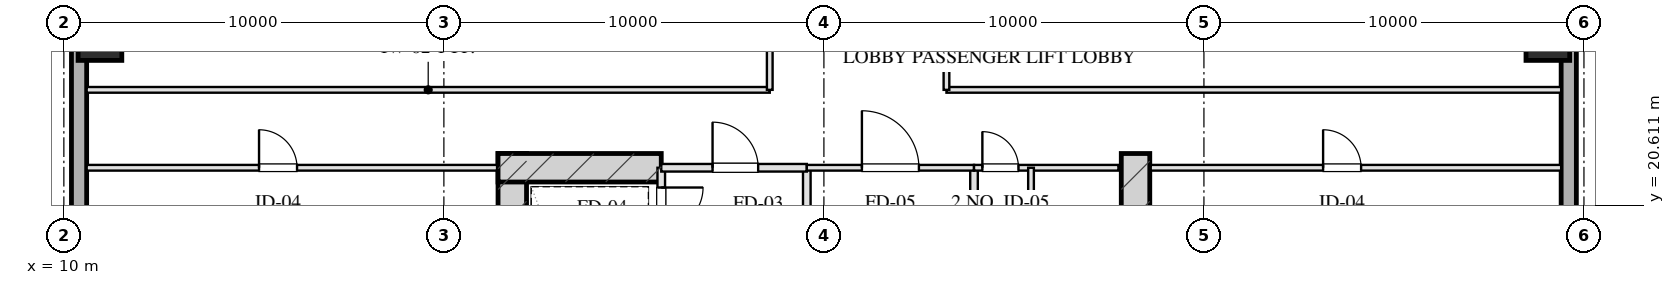
"""IFC4 building model, lengths in metres.
Left out: names, types, materials, properties, quantities, classifications, styles, units other than length and angle.
Written with IfcOpenShell. Run it as: python <this file> out.ifc"""

import sys

from ifc_helpers import new_model, si_unit, direction, frame, frame_2d, origin, origin_2d, place, context, subcontext, project, spatial, rectangle, hollow_rectangle, extrude, element, fill, save


model = new_model("IFC4")
c1 = context("Model", 3, precision=1e-05, world=origin(), true_north=direction((0.0, 1.0)))
c2 = subcontext(c1, "Body", "Model", "MODEL_VIEW")
j1 = project(units=[si_unit("LENGTHUNIT", "METRE"), si_unit("PLANEANGLEUNIT", "RADIAN")], contexts=[c1])
p1 = place(None, origin())
s1 = spatial("IfcSite", under=j1, at=p1, CompositionType="ELEMENT")
p2 = place(p1, origin())
s2 = spatial("IfcBuilding", under=s1, at=p2, CompositionType="ELEMENT")
p3 = place(p2, frame((0.0, 0.0, 64.4)))
s3 = spatial("IfcBuildingStorey", under=s2, at=p3, CompositionType="ELEMENT", Elevation=64.4)
for number, where, z_axis, x_axis in (
    (1, (21.8, 21.975, 0.0), (0.0, 0.0, 1.0), (0.0, -1.0, 0.0)),
    (2, (38.2, 21.975, 0.0), (0.0, 0.0, 1.0), (0.0, -1.0, 0.0)),
):
    element("IfcWall", number, at=place(p3, frame(where, z_axis=z_axis, x_axis=x_axis)), inside=s3, PredefinedType="SHEAR", context=c2, shape_type="SweptSolid", body=[
        extrude(rectangle(XDim=9.63, YDim=0.75, at=frame_2d((4.815, 0.0))), origin(), (0.0, 0.0, 1.0), 3.45),
    ])
p4 = place(p3, frame((21.425, 21.6, 0.0), z_axis=(0.0, 0.0, 1.0), x_axis=(1.0, 0.0, 0.0)))
e3 = element("IfcWall", 3, at=p4, inside=s3, PredefinedType="SHEAR", context=c2, shape_type="SweptSolid", body=[
    extrude(rectangle(XDim=4.295, YDim=0.75, at=frame_2d((2.147, 0.0))), origin(), (0.0, 0.0, 1.0), 3.45),
])
for number, where, z_axis, x_axis in (
    (4, (10.95, 25.0, 0.0), (0.0, 0.0, 1.0), (1.0, 0.0, 0.0)),
    (5, (49.05, 25.0, 0.0), (0.0, 0.0, 1.0), (1.0, 0.0, 0.0)),
):
    element("IfcColumn", number, at=place(p3, frame(where, z_axis=z_axis, x_axis=x_axis)), inside=s3, PredefinedType="COLUMN", context=c2, shape_type="SweptSolid", body=[
        extrude(hollow_rectangle(XDim=1.15, YDim=1.15, WallThickness=0.04, at=origin_2d()), origin(), (0.0, 0.0, 1.0), 3.451),
    ])
p5 = place(p3, frame((10.4, 7.2, 0.0), z_axis=(0.0, 0.0, 1.0), x_axis=(0.0, 1.0, 0.0)))
e6 = element("IfcWall", 6, at=p5, inside=s3, PredefinedType="SOLIDWALL", context=c2, shape_type="SweptSolid", body=[
    extrude(rectangle(XDim=53.6, YDim=0.4, at=frame_2d((26.8, 0.0))), origin(), (0.0, 0.0, 1.0), 2.61),
])
p6 = place(p5, frame((19.15, 0.0, 0.75)))
e7 = element("IfcOpeningElement", 7, at=p6, cuts=e6, PredefinedType="OPENING", context=c2, shape_type="SweptSolid", body=[
    extrude(rectangle(XDim=2.5, YDim=1.46, at=frame_2d((1.25, 0.73))), frame((0.0, 0.21, 0.0), z_axis=(0.0, -1.0, 0.0), x_axis=(1.0, 0.0, 0.0)), (0.0, 0.0, 1.0), 0.42),
])
p7 = place(p5, frame((31.95, 0.0, 0.75)))
e8 = element("IfcOpeningElement", 8, at=p7, cuts=e6, PredefinedType="OPENING", context=c2, shape_type="SweptSolid", body=[
    extrude(rectangle(XDim=2.5, YDim=1.46, at=frame_2d((1.25, 0.73))), frame((0.0, 0.21, 0.0), z_axis=(0.0, -1.0, 0.0), x_axis=(1.0, 0.0, 0.0)), (0.0, 0.0, 1.0), 0.42),
])
p8 = place(p3, frame((49.6, 60.8, 0.0), z_axis=(0.0, 0.0, 1.0), x_axis=(0.0, -1.0, 0.0)))
e9 = element("IfcWall", 9, at=p8, inside=s3, PredefinedType="SOLIDWALL", context=c2, shape_type="SweptSolid", body=[
    extrude(rectangle(XDim=53.6, YDim=0.4, at=frame_2d((26.8, 0.0))), origin(), (0.0, 0.0, 1.0), 2.61),
])
p9 = place(p8, frame((28.15, 0.0, 0.75)))
e10 = element("IfcOpeningElement", 10, at=p9, cuts=e9, PredefinedType="OPENING", context=c2, shape_type="SweptSolid", body=[
    extrude(rectangle(XDim=2.5, YDim=1.46, at=frame_2d((1.25, 0.73))), frame((0.0, 0.21, 0.0), z_axis=(0.0, -1.0, 0.0), x_axis=(1.0, 0.0, 0.0)), (0.0, 0.0, 1.0), 0.42),
])
p10 = place(p8, frame((22.95, 0.0, 0.75)))
e11 = element("IfcOpeningElement", 11, at=p10, cuts=e9, PredefinedType="OPENING", context=c2, shape_type="SweptSolid", body=[
    extrude(rectangle(XDim=2.5, YDim=1.46, at=frame_2d((1.25, 0.73))), frame((0.0, 0.21, 0.0), z_axis=(0.0, -1.0, 0.0), x_axis=(1.0, 0.0, 0.0)), (0.0, 0.0, 1.0), 0.42),
])
p11 = place(p3, frame((25.72, 21.6, 0.0), z_axis=(0.0, 0.0, 1.0), x_axis=(0.0, -1.0, 0.0)))
e12 = element("IfcWall", 12, at=p11, inside=s3, PredefinedType="PARTITIONING", context=c2, shape_type="SweptSolid", body=[
    extrude(rectangle(XDim=1.9, YDim=0.2, at=frame_2d((0.95, 0.0))), origin(), (0.0, 0.0, 1.0), 3.175),
])
p12 = place(p11, frame((0.52, 0.0, 0.0)))
e13 = element("IfcOpeningElement", 13, at=p12, cuts=e12, PredefinedType="OPENING", context=c2, shape_type="SweptSolid", body=[
    extrude(rectangle(XDim=1.1, YDim=2.05, at=frame_2d((0.55, 1.025))), frame((0.0, 0.11, 0.0), z_axis=(0.0, -1.0, 0.0), x_axis=(1.0, 0.0, 0.0)), (0.0, 0.0, 1.0), 0.22),
])
p13 = place(p3, frame((29.55, 21.6, 0.0), z_axis=(0.0, 0.0, 1.0), x_axis=(0.0, -1.0, 0.0)))
e14 = element("IfcWall", 14, at=p13, inside=s3, PredefinedType="PARTITIONING", context=c2, shape_type="SweptSolid", body=[
    extrude(rectangle(XDim=8.43, YDim=0.2, at=frame_2d((4.215, 0.0))), origin(), (0.0, 0.0, 1.0), 3.175),
])
p14 = place(p3, frame((25.72, 21.6, 0.0), z_axis=(0.0, 0.0, 1.0), x_axis=(1.0, 0.0, 0.0)))
e15 = element("IfcWall", 15, at=p14, inside=s3, PredefinedType="PARTITIONING", context=c2, shape_type="SweptSolid", body=[
    extrude(rectangle(XDim=3.83, YDim=0.2, at=frame_2d((1.915, 0.0))), origin(), (0.0, 0.0, 1.0), 3.175),
])
p15 = place(p14, frame((1.35, 0.0, 0.0)))
e16 = element("IfcOpeningElement", 16, at=p15, cuts=e15, PredefinedType="OPENING", context=c2, shape_type="SweptSolid", body=[
    extrude(rectangle(XDim=1.2, YDim=2.05, at=frame_2d((0.6, 1.025))), frame((0.0, 0.11, 0.0), z_axis=(0.0, -1.0, 0.0), x_axis=(1.0, 0.0, 0.0)), (0.0, 0.0, 1.0), 0.22),
])
p16 = place(p3, frame((33.95, 21.6, 0.0), z_axis=(0.0, 0.0, 1.0), x_axis=(0.0, -1.0, 0.0)))
e17 = element("IfcWall", 17, at=p16, inside=s3, PredefinedType="PARTITIONING", context=c2, shape_type="SweptSolid", body=[
    extrude(rectangle(XDim=8.43, YDim=0.2, at=frame_2d((4.215, 0.0))), origin(), (0.0, 0.0, 1.0), 3.175),
])
p17 = place(p3, frame((29.55, 21.6, 0.0), z_axis=(0.0, 0.0, 1.0), x_axis=(1.0, 0.0, 0.0)))
e18 = element("IfcWall", 18, at=p17, inside=s3, PredefinedType="PARTITIONING", context=c2, shape_type="SweptSolid", body=[
    extrude(rectangle(XDim=4.4, YDim=0.15, at=frame_2d((2.2, 0.0))), origin(), (0.0, 0.0, 1.0), 3.175),
])
p18 = place(p17, frame((1.45, 0.0, 0.0)))
e19 = element("IfcOpeningElement", 19, at=p18, cuts=e18, PredefinedType="OPENING", context=c2, shape_type="SweptSolid", body=[
    extrude(rectangle(XDim=1.5, YDim=2.05, at=frame_2d((0.75, 1.025))), frame((0.0, 0.085, 0.0), z_axis=(0.0, -1.0, 0.0), x_axis=(1.0, 0.0, 0.0)), (0.0, 0.0, 1.0), 0.17),
])
p19 = place(p3, frame((33.95, 21.6, 0.0), z_axis=(0.0, 0.0, 1.0), x_axis=(1.0, 0.0, 0.0)))
e20 = element("IfcWall", 20, at=p19, inside=s3, PredefinedType="PARTITIONING", context=c2, shape_type="SweptSolid", body=[
    extrude(rectangle(XDim=3.8, YDim=0.15, at=frame_2d((1.9, 0.0))), origin(), (0.0, 0.0, 1.0), 3.175),
])
p20 = place(p19, frame((0.22, 0.0, 0.0)))
e21 = element("IfcOpeningElement", 21, at=p20, cuts=e20, PredefinedType="OPENING", context=c2, shape_type="SweptSolid", body=[
    extrude(rectangle(XDim=0.95, YDim=2.05, at=frame_2d((0.475, 1.025))), frame((0.0, 0.085, 0.0), z_axis=(0.0, -1.0, 0.0), x_axis=(1.0, 0.0, 0.0)), (0.0, 0.0, 1.0), 0.17),
])
p21 = place(p3, frame((35.45, 21.6, 0.0), z_axis=(0.0, 0.0, 1.0), x_axis=(0.0, -1.0, 0.0)))
e22 = element("IfcWall", 22, at=p21, inside=s3, PredefinedType="PARTITIONING", context=c2, shape_type="SweptSolid", body=[
    extrude(rectangle(XDim=8.43, YDim=0.15, at=frame_2d((4.215, 0.0))), origin(), (0.0, 0.0, 1.0), 2.815),
])
p22 = place(p21, frame((2.55, 0.0, 0.0)))
e23 = element("IfcOpeningElement", 23, at=p22, cuts=e22, PredefinedType="OPENING", context=c2, shape_type="SweptSolid", body=[
    extrude(rectangle(XDim=0.95, YDim=2.05, at=frame_2d((0.475, 1.025))), frame((0.0, 0.085, 0.0), z_axis=(0.0, -1.0, 0.0), x_axis=(1.0, 0.0, 0.0)), (0.0, 0.0, 1.0), 0.17),
])
p23 = place(p21, frame((4.7, 0.0, 0.0)))
e24 = element("IfcOpeningElement", 24, at=p23, cuts=e22, PredefinedType="OPENING", context=c2, shape_type="SweptSolid", body=[
    extrude(rectangle(XDim=0.9, YDim=2.05, at=frame_2d((0.45, 1.025))), frame((0.0, 0.085, 0.0), z_axis=(0.0, -1.0, 0.0), x_axis=(1.0, 0.0, 0.0)), (0.0, 0.0, 1.0), 0.17),
])
p24 = place(p21, frame((6.8, 0.0, 0.0)))
e25 = element("IfcOpeningElement", 25, at=p24, cuts=e22, PredefinedType="OPENING", context=c2, shape_type="SweptSolid", body=[
    extrude(rectangle(XDim=0.9, YDim=2.05, at=frame_2d((0.45, 1.025))), frame((0.0, 0.085, 0.0), z_axis=(0.0, -1.0, 0.0), x_axis=(1.0, 0.0, 0.0)), (0.0, 0.0, 1.0), 0.17),
])
p25 = place(p3, frame((10.6, 21.6, 0.0), z_axis=(0.0, 0.0, 1.0), x_axis=(1.0, 0.0, 0.0)))
e26 = element("IfcWall", 26, at=p25, inside=s3, PredefinedType="PARTITIONING", context=c2, shape_type="SweptSolid", body=[
    extrude(rectangle(XDim=10.8, YDim=0.15, at=frame_2d((5.4, 0.0))), origin(), (0.0, 0.0, 1.0), 3.175),
])
p26 = place(p25, frame((4.536, 0.0, 0.0)))
e27 = element("IfcOpeningElement", 27, at=p26, cuts=e26, PredefinedType="OPENING", context=c2, shape_type="SweptSolid", body=[
    extrude(rectangle(XDim=1.0, YDim=2.05, at=frame_2d((0.5, 1.025))), frame((0.0, 0.085, 0.0), z_axis=(0.0, -1.0, 0.0), x_axis=(1.0, 0.0, 0.0)), (0.0, 0.0, 1.0), 0.17),
])
p27 = place(p3, frame((38.6, 21.6, 0.0), z_axis=(0.0, 0.0, 1.0), x_axis=(1.0, 0.0, 0.0)))
e28 = element("IfcWall", 28, at=p27, inside=s3, PredefinedType="PARTITIONING", context=c2, shape_type="SweptSolid", body=[
    extrude(rectangle(XDim=10.8, YDim=0.15, at=frame_2d((5.4, 0.0))), origin(), (0.0, 0.0, 1.0), 3.175),
])
p28 = place(p27, frame((4.536, 0.0, 0.0)))
e29 = element("IfcOpeningElement", 29, at=p28, cuts=e28, PredefinedType="OPENING", context=c2, shape_type="SweptSolid", body=[
    extrude(rectangle(XDim=1.0, YDim=2.05, at=frame_2d((0.5, 1.025))), frame((0.0, 0.085, 0.0), z_axis=(0.0, -1.0, 0.0), x_axis=(1.0, 0.0, 0.0)), (0.0, 0.0, 1.0), 0.17),
])
p29 = place(p3, frame((10.6, 23.65, 0.0), z_axis=(0.0, 0.0, 1.0), x_axis=(1.0, 0.0, 0.0)))
e30 = element("IfcWall", 30, at=p29, inside=s3, PredefinedType="PARTITIONING", context=c2, shape_type="SweptSolid", body=[
    extrude(rectangle(XDim=17.975, YDim=0.15, at=frame_2d((8.987, 0.0))), origin(), (0.0, 0.0, 1.0), 3.175),
])
p30 = place(p3, frame((33.225, 23.65, 0.0), z_axis=(0.0, 0.0, 1.0), x_axis=(1.0, 0.0, 0.0)))
e31 = element("IfcWall", 31, at=p30, inside=s3, PredefinedType="PARTITIONING", context=c2, shape_type="SweptSolid", body=[
    extrude(rectangle(XDim=16.175, YDim=0.15, at=frame_2d((8.087, 0.0))), origin(), (0.0, 0.0, 1.0), 3.175),
])
p31 = place(p3, frame((28.575, 23.65, 0.0), z_axis=(0.0, 0.0, 1.0), x_axis=(0.0, 1.0, 0.0)))
e32 = element("IfcWall", 32, at=p31, inside=s3, PredefinedType="PARTITIONING", context=c2, shape_type="SweptSolid", body=[
    extrude(rectangle(XDim=20.7, YDim=0.15, at=frame_2d((10.35, 0.0))), origin(), (0.0, 0.0, 1.0), 3.175),
])
p32 = place(p31, frame((2.675, 0.0, 0.0)))
e33 = element("IfcOpeningElement", 33, at=p32, cuts=e32, PredefinedType="OPENING", context=c2, shape_type="SweptSolid", body=[
    extrude(rectangle(XDim=1.0, YDim=2.05, at=frame_2d((0.5, 1.025))), frame((0.0, 0.085, 0.0), z_axis=(0.0, -1.0, 0.0), x_axis=(1.0, 0.0, 0.0)), (0.0, 0.0, 1.0), 0.17),
])
p33 = place(p31, frame((9.85, 0.0, 0.0)))
e34 = element("IfcOpeningElement", 34, at=p33, cuts=e32, PredefinedType="OPENING", context=c2, shape_type="SweptSolid", body=[
    extrude(rectangle(XDim=1.0, YDim=2.05, at=frame_2d((0.5, 1.025))), frame((0.0, 0.085, 0.0), z_axis=(0.0, -1.0, 0.0), x_axis=(1.0, 0.0, 0.0)), (0.0, 0.0, 1.0), 0.17),
])
p34 = place(p31, frame((17.025, 0.0, 0.0)))
e35 = element("IfcOpeningElement", 35, at=p34, cuts=e32, PredefinedType="OPENING", context=c2, shape_type="SweptSolid", body=[
    extrude(rectangle(XDim=1.0, YDim=2.05, at=frame_2d((0.5, 1.025))), frame((0.0, 0.085, 0.0), z_axis=(0.0, -1.0, 0.0), x_axis=(1.0, 0.0, 0.0)), (0.0, 0.0, 1.0), 0.17),
])
p35 = place(p3, frame((33.225, 23.65, 0.0), z_axis=(0.0, 0.0, 1.0), x_axis=(0.0, 1.0, 0.0)))
e36 = element("IfcWall", 36, at=p35, inside=s3, PredefinedType="PARTITIONING", context=c2, shape_type="SweptSolid", body=[
    extrude(rectangle(XDim=20.7, YDim=0.15, at=frame_2d((10.35, 0.0))), origin(), (0.0, 0.0, 1.0), 3.175),
])
p36 = place(p35, frame((2.175, 0.0, 0.0)))
e37 = element("IfcOpeningElement", 37, at=p36, cuts=e36, PredefinedType="OPENING", context=c2, shape_type="SweptSolid", body=[
    extrude(rectangle(XDim=1.0, YDim=2.05, at=frame_2d((0.5, 1.025))), frame((0.0, 0.085, 0.0), z_axis=(0.0, -1.0, 0.0), x_axis=(1.0, 0.0, 0.0)), (0.0, 0.0, 1.0), 0.17),
])
p37 = place(p35, frame((7.69, 0.0, 0.0)))
e38 = element("IfcOpeningElement", 38, at=p37, cuts=e36, PredefinedType="OPENING", context=c2, shape_type="SweptSolid", body=[
    extrude(rectangle(XDim=1.0, YDim=2.05, at=frame_2d((0.5, 1.025))), frame((0.0, 0.085, 0.0), z_axis=(0.0, -1.0, 0.0), x_axis=(1.0, 0.0, 0.0)), (0.0, 0.0, 1.0), 0.17),
])
p38 = place(p35, frame((12.69, 0.0, 0.0)))
e39 = element("IfcOpeningElement", 39, at=p38, cuts=e36, PredefinedType="OPENING", context=c2, shape_type="SweptSolid", body=[
    extrude(rectangle(XDim=1.05, YDim=2.05, at=frame_2d((0.525, 1.025))), frame((0.0, 0.085, 0.0), z_axis=(0.0, -1.0, 0.0), x_axis=(1.0, 0.0, 0.0)), (0.0, 0.0, 1.0), 0.17),
])
p39 = place(p35, frame((17.525, 0.0, 0.0)))
e40 = element("IfcOpeningElement", 40, at=p39, cuts=e36, PredefinedType="OPENING", context=c2, shape_type="SweptSolid", body=[
    extrude(rectangle(XDim=1.0, YDim=2.05, at=frame_2d((0.5, 1.025))), frame((0.0, 0.085, 0.0), z_axis=(0.0, -1.0, 0.0), x_axis=(1.0, 0.0, 0.0)), (0.0, 0.0, 1.0), 0.17),
])
p40 = place(p12, origin())
e41 = element("IfcDoor", 41, at=p40, inside=s3, OperationType="SINGLE_SWING_LEFT", PredefinedType="DOOR", context=c2, shape_type="SweptSolid", body=[
    extrude(rectangle(XDim=1.1, YDim=2.05, at=frame_2d((0.55, 1.025))), frame((0.0, 0.025, 0.0), z_axis=(0.0, -1.0, 0.0), x_axis=(1.0, 0.0, 0.0)), (0.0, 0.0, 1.0), 0.05),
])
fill(e13, e41)
p41 = place(p15, origin())
e42 = element("IfcDoor", 42, at=p41, inside=s3, OperationType="SINGLE_SWING_LEFT", PredefinedType="DOOR", context=c2, shape_type="SweptSolid", body=[
    extrude(rectangle(XDim=1.2, YDim=2.05, at=frame_2d((0.6, 1.025))), frame((0.0, 0.025, 0.0), z_axis=(0.0, -1.0, 0.0), x_axis=(1.0, 0.0, 0.0)), (0.0, 0.0, 1.0), 0.05),
])
fill(e16, e42)
p42 = place(p18, origin())
e43 = element("IfcDoor", 43, at=p42, inside=s3, OperationType="SINGLE_SWING_LEFT", PredefinedType="DOOR", context=c2, shape_type="SweptSolid", body=[
    extrude(rectangle(XDim=1.5, YDim=2.05, at=frame_2d((0.75, 1.025))), frame((0.0, 0.025, 0.0), z_axis=(0.0, -1.0, 0.0), x_axis=(1.0, 0.0, 0.0)), (0.0, 0.0, 1.0), 0.05),
])
fill(e19, e43)
p43 = place(p20, origin())
e44 = element("IfcDoor", 44, at=p43, inside=s3, OperationType="SINGLE_SWING_LEFT", PredefinedType="DOOR", context=c2, shape_type="SweptSolid", body=[
    extrude(rectangle(XDim=0.95, YDim=2.05, at=frame_2d((0.475, 1.025))), frame((0.0, 0.025, 0.0), z_axis=(0.0, -1.0, 0.0), x_axis=(1.0, 0.0, 0.0)), (0.0, 0.0, 1.0), 0.05),
])
fill(e21, e44)
p44 = place(p26, origin())
e45 = element("IfcDoor", 45, at=p44, inside=s3, OperationType="SINGLE_SWING_LEFT", PredefinedType="DOOR", context=c2, shape_type="SweptSolid", body=[
    extrude(rectangle(XDim=1.0, YDim=2.05, at=frame_2d((0.5, 1.025))), frame((0.0, 0.025, 0.0), z_axis=(0.0, -1.0, 0.0), x_axis=(1.0, 0.0, 0.0)), (0.0, 0.0, 1.0), 0.05),
])
fill(e27, e45)
p45 = place(p28, origin())
e46 = element("IfcDoor", 46, at=p45, inside=s3, OperationType="SINGLE_SWING_LEFT", PredefinedType="DOOR", context=c2, shape_type="SweptSolid", body=[
    extrude(rectangle(XDim=1.0, YDim=2.05, at=frame_2d((0.5, 1.025))), frame((0.0, 0.025, 0.0), z_axis=(0.0, -1.0, 0.0), x_axis=(1.0, 0.0, 0.0)), (0.0, 0.0, 1.0), 0.05),
])
fill(e29, e46)
save(model, sys.argv[1])
